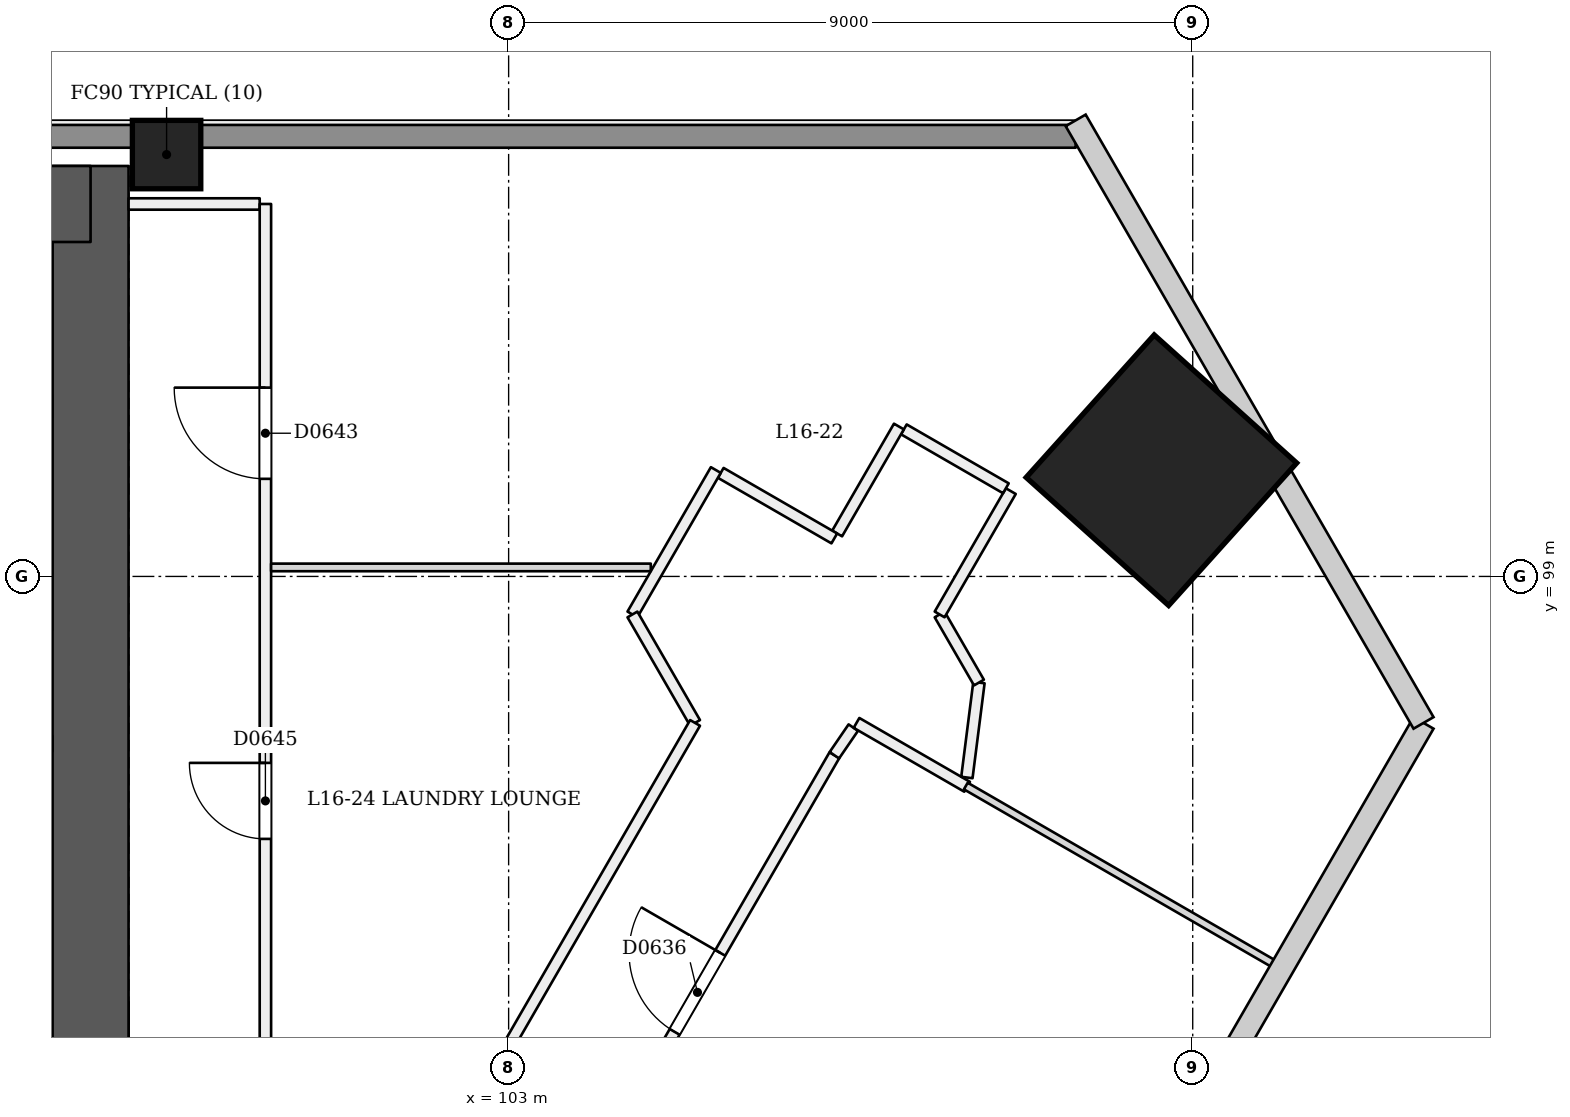
"""IFC4 building model, lengths in metres.
Left out: names, types, materials, properties, quantities, classifications, styles, units other than length and angle.
Written with IfcOpenShell. Run it as: python <this file> out.ifc"""

import sys

from ifc_helpers import new_model, si_unit, direction, frame, frame_2d, origin, origin_2d, place, context, subcontext, project, spatial, rectangle, extrude, element, fill, save


model = new_model("IFC4")
c1 = context("Model", 3, precision=1e-05, world=origin(), true_north=direction((0.0, 1.0)))
c2 = subcontext(c1, "Body", "Model", "MODEL_VIEW")
j1 = project(units=[si_unit("LENGTHUNIT", "METRE"), si_unit("PLANEANGLEUNIT", "RADIAN")], contexts=[c1])
p1 = place(None, origin())
s1 = spatial("IfcSite", under=j1, at=p1, CompositionType="ELEMENT")
p2 = place(p1, origin())
s2 = spatial("IfcBuilding", under=s1, at=p2, CompositionType="ELEMENT")
p3 = place(p2, frame((0.0, 0.0, 66.6)))
s3 = spatial("IfcBuildingStorey", under=s2, at=p3, CompositionType="ELEMENT", Elevation=66.6)
p4 = place(p3, frame((72.5, 92.9, 0.0), z_axis=(0.0, 0.0, 1.0), x_axis=(1.0, 0.0, 0.0)))
e1 = element("IfcWall", 1, at=p4, inside=s3, PredefinedType="SHEAR", context=c2, shape_type="SweptSolid", body=[
    extrude(rectangle(XDim=25.5, YDim=1.0, at=frame_2d((12.75, 0.0))), origin(), (0.0, 0.0, 1.0), 3.6),
])
p5 = place(p4, frame((1.3, 0.0, 0.0)))
e2 = element("IfcOpeningElement", 2, at=p5, cuts=e1, PredefinedType="OPENING", context=c2, shape_type="SweptSolid", body=[
    extrude(rectangle(XDim=1.2, YDim=2.1, at=frame_2d((0.6, 1.05))), frame((0.0, 0.51, 0.0), z_axis=(0.0, -1.0, 0.0), x_axis=(1.0, 0.0, 0.0)), (0.0, 0.0, 1.0), 1.021),
])
p6 = place(p4, frame((3.5, 0.0, 0.0)))
e3 = element("IfcOpeningElement", 3, at=p6, cuts=e1, PredefinedType="OPENING", context=c2, shape_type="SweptSolid", body=[
    extrude(rectangle(XDim=1.2, YDim=2.1, at=frame_2d((0.6, 1.05))), frame((0.0, 0.51, 0.0), z_axis=(0.0, -1.0, 0.0), x_axis=(1.0, 0.0, 0.0)), (0.0, 0.0, 1.0), 1.021),
])
p7 = place(p4, frame((13.5, 0.0, 0.0)))
e4 = element("IfcOpeningElement", 4, at=p7, cuts=e1, PredefinedType="OPENING", context=c2, shape_type="SweptSolid", body=[
    extrude(rectangle(XDim=1.2, YDim=2.1, at=frame_2d((0.6, 1.05))), frame((0.0, 0.51, 0.0), z_axis=(0.0, -1.0, 0.0), x_axis=(1.0, 0.0, 0.0)), (0.0, 0.0, 1.0), 1.021),
])
p8 = place(p4, frame((16.363, 0.0, 0.0)))
e5 = element("IfcOpeningElement", 5, at=p8, cuts=e1, PredefinedType="OPENING", context=c2, shape_type="SweptSolid", body=[
    extrude(rectangle(XDim=1.0, YDim=2.1, at=frame_2d((0.5, 1.05))), frame((0.0, 0.51, 0.0), z_axis=(0.0, -1.0, 0.0), x_axis=(1.0, 0.0, 0.0)), (0.0, 0.0, 1.0), 1.021),
])
p9 = place(p4, frame((19.8, 0.0, 0.0)))
e6 = element("IfcOpeningElement", 6, at=p9, cuts=e1, PredefinedType="OPENING", context=c2, shape_type="SweptSolid", body=[
    extrude(rectangle(XDim=1.0, YDim=2.1, at=frame_2d((0.5, 1.05))), frame((0.0, 0.51, 0.0), z_axis=(0.0, -1.0, 0.0), x_axis=(1.0, 0.0, 0.0)), (0.0, 0.0, 1.0), 1.021),
])
p10 = place(p4, frame((22.788, 0.0, 0.0)))
e7 = element("IfcOpeningElement", 7, at=p10, cuts=e1, PredefinedType="OPENING", context=c2, shape_type="SweptSolid", body=[
    extrude(rectangle(XDim=1.0, YDim=2.1, at=frame_2d((0.5, 1.05))), frame((0.0, 0.51, 0.0), z_axis=(0.0, -1.0, 0.0), x_axis=(1.0, 0.0, 0.0)), (0.0, 0.0, 1.0), 1.021),
])
p11 = place(p3, frame((97.5, 92.9, 0.0), z_axis=(0.0, 0.0, 1.0), x_axis=(0.0, 1.0, 0.0)))
e8 = element("IfcWall", 8, at=p11, inside=s3, PredefinedType="SHEAR", context=c2, shape_type="SweptSolid", body=[
    extrude(rectangle(XDim=11.5, YDim=1.0, at=frame_2d((5.75, 0.0))), origin(), (0.0, 0.0, 1.0), 3.6),
])
p12 = place(p3, frame((97.5, 103.9, 0.0), z_axis=(0.0, 0.0, 1.0), x_axis=(-1.0, 0.0, 0.0)))
e9 = element("IfcWall", 9, at=p12, inside=s3, PredefinedType="SHEAR", context=c2, shape_type="SweptSolid", body=[
    extrude(rectangle(XDim=25.5, YDim=1.0, at=frame_2d((12.75, 0.0))), origin(), (0.0, 0.0, 1.0), 3.6),
])
p13 = place(p3, frame((111.623, 100.386, 0.0), z_axis=(-0.028403721265, 0.009287135593, 0.999553389135), x_axis=(0.498883740729, -0.866383866755, 0.02222630567)))
e10 = element("IfcColumn", 10, at=p13, inside=s3, PredefinedType="COLUMN", context=c2, shape_type="SweptSolid", body=[
    extrude(rectangle(XDim=2.52, YDim=2.52, at=origin_2d()), origin(), (0.0, 0.0, 1.0), 3.602),
])
p14 = place(p3, frame((98.5, 104.55, 0.0), z_axis=(0.0, 0.0, 1.0), x_axis=(1.0, 0.0, 0.0)))
e11 = element("IfcColumn", 11, at=p14, inside=s3, PredefinedType="COLUMN", context=c2, shape_type="SweptSolid", body=[
    extrude(rectangle(XDim=0.9, YDim=0.9, at=origin_2d()), origin(), (0.0, 0.0, 1.0), 3.6),
])
p15 = place(p3, frame((85.824, 59.475, 0.0), z_axis=(0.0, 0.0, 1.0), x_axis=(0.499998498473, 0.86602627069, 0.0)))
e12 = element("IfcWall", 12, at=p15, inside=s3, PredefinedType="PARTITIONING", context=c2, shape_type="SweptSolid", body=[
    extrude(rectangle(XDim=42.924, YDim=0.15, at=frame_2d((21.462, 0.0))), origin(), (0.0, 0.0, 1.0), 2.7),
])
p16 = place(p15, frame((3.492, 0.0, 0.0)))
e13 = element("IfcOpeningElement", 13, at=p16, cuts=e12, PredefinedType="OPENING", context=c2, shape_type="SweptSolid", body=[
    extrude(rectangle(XDim=1.2, YDim=2.1, at=frame_2d((0.6, 1.05))), frame((0.0, 0.085, 0.0), z_axis=(0.0, -1.0, 0.0), x_axis=(1.0, 0.0, 0.0)), (0.0, 0.0, 1.0), 0.171),
])
p17 = place(p15, frame((14.357, 0.0, 0.0)))
e14 = element("IfcOpeningElement", 14, at=p17, cuts=e12, PredefinedType="OPENING", context=c2, shape_type="SweptSolid", body=[
    extrude(rectangle(XDim=1.2, YDim=2.1, at=frame_2d((0.6, 1.05))), frame((0.0, 0.085, 0.0), z_axis=(0.0, -1.0, 0.0), x_axis=(1.0, 0.0, 0.0)), (0.0, 0.0, 1.0), 0.171),
])
p18 = place(p15, frame((27.857, 0.0, 0.0)))
e15 = element("IfcOpeningElement", 15, at=p18, cuts=e12, PredefinedType="OPENING", context=c2, shape_type="SweptSolid", body=[
    extrude(rectangle(XDim=1.2, YDim=2.1, at=frame_2d((0.6, 1.05))), frame((0.0, 0.085, 0.0), z_axis=(0.0, -1.0, 0.0), x_axis=(1.0, 0.0, 0.0)), (0.0, 0.0, 1.0), 0.171),
])
p19 = place(p15, frame((38.721, 0.0, 0.0)))
e16 = element("IfcOpeningElement", 16, at=p19, cuts=e12, PredefinedType="OPENING", context=c2, shape_type="SweptSolid", body=[
    extrude(rectangle(XDim=1.2, YDim=2.1, at=frame_2d((0.6, 1.05))), frame((0.0, 0.085, 0.0), z_axis=(0.0, -1.0, 0.0), x_axis=(1.0, 0.0, 0.0)), (0.0, 0.0, 1.0), 0.171),
])
p20 = place(p3, frame((107.286, 96.648, 0.0), z_axis=(0.0, 0.0, 1.0), x_axis=(0.565021791191, 0.82507598164, 0.0)))
e17 = element("IfcWall", 17, at=p20, inside=s3, PredefinedType="PARTITIONING", context=c2, shape_type="SweptSolid", body=[
    extrude(rectangle(XDim=0.44, YDim=0.15, at=frame_2d((0.22, 0.0))), origin(), (0.0, 0.0, 1.0), 3.1),
])
p21 = place(p3, frame((107.577, 97.073, 0.0), z_axis=(0.0, 0.0, 1.0), x_axis=(0.865999293341, -0.500045221889, 0.0)))
e18 = element("IfcWall", 18, at=p21, inside=s3, PredefinedType="PARTITIONING", context=c2, shape_type="SweptSolid", body=[
    extrude(rectangle(XDim=1.68, YDim=0.15, at=frame_2d((0.84, 0.0))), origin(), (0.0, 0.0, 1.0), 3.1),
])
p22 = place(p3, frame((99.725, 103.9, 0.0), z_axis=(0.0, 0.0, 1.0), x_axis=(-1.0, 0.0, 0.0)))
e19 = element("IfcWall", 19, at=p22, inside=s3, PredefinedType="PARTITIONING", context=c2, shape_type="SweptSolid", body=[
    extrude(rectangle(XDim=1.725, YDim=0.15, at=frame_2d((0.863, 0.0))), origin(), (0.0, 0.0, 1.0), 2.6),
])
p23 = place(p3, frame((109.029, 96.355, 0.0), z_axis=(0.0, 0.0, 1.0), x_axis=(0.126039175565, 0.992025264912, 0.0)))
e20 = element("IfcWall", 20, at=p23, inside=s3, PredefinedType="PARTITIONING", context=c2, shape_type="SweptSolid", body=[
    extrude(rectangle(XDim=1.259, YDim=0.15, at=frame_2d((0.629, 0.0))), origin(), (0.0, 0.0, 1.0), 3.1),
])
p24 = place(p3, frame((109.188, 97.604, 0.0), z_axis=(0.0, 0.0, 1.0), x_axis=(-0.500096801311, 0.865969508308, 0.0)))
e21 = element("IfcWall", 21, at=p24, inside=s3, PredefinedType="PARTITIONING", context=c2, shape_type="SweptSolid", body=[
    extrude(rectangle(XDim=1.035, YDim=0.15, at=frame_2d((0.518, 0.0))), origin(), (0.0, 0.0, 1.0), 3.1),
])
p25 = place(p3, frame((108.67, 98.5, 0.0), z_axis=(0.0, 0.0, 1.0), x_axis=(0.499951854219, 0.86605319898, 0.0)))
e22 = element("IfcWall", 22, at=p25, inside=s3, PredefinedType="PARTITIONING", context=c2, shape_type="SweptSolid", body=[
    extrude(rectangle(XDim=1.873, YDim=0.15, at=frame_2d((0.937, 0.0))), origin(), (0.0, 0.0, 1.0), 3.1),
])
p26 = place(p3, frame((109.542, 100.16, 0.0), z_axis=(0.0, 0.0, 1.0), x_axis=(-0.865975732936, 0.500086022567, 0.0)))
e23 = element("IfcWall", 23, at=p26, inside=s3, PredefinedType="PARTITIONING", context=c2, shape_type="SweptSolid", body=[
    extrude(rectangle(XDim=1.55, YDim=0.15, at=frame_2d((0.775, 0.0))), origin(), (0.0, 0.0, 1.0), 3.1),
])
p27 = place(p3, frame((108.135, 100.972, 0.0), z_axis=(0.0, 0.0, 1.0), x_axis=(-0.500017246033, -0.866015446554, 0.0)))
e24 = element("IfcWall", 24, at=p27, inside=s3, PredefinedType="PARTITIONING", context=c2, shape_type="SweptSolid", body=[
    extrude(rectangle(XDim=1.625, YDim=0.15, at=frame_2d((0.812, 0.0))), origin(), (0.0, 0.0, 1.0), 3.1),
])
p28 = place(p3, frame((107.284, 99.5, 0.0), z_axis=(0.0, 0.0, 1.0), x_axis=(-0.866013532718, 0.500020560727, 0.0)))
e25 = element("IfcWall", 25, at=p28, inside=s3, PredefinedType="PARTITIONING", context=c2, shape_type="SweptSolid", body=[
    extrude(rectangle(XDim=1.725, YDim=0.15, at=frame_2d((0.863, 0.0))), origin(), (0.0, 0.0, 1.0), 3.1),
])
p29 = place(p3, frame((105.726, 100.4, 0.0), z_axis=(0.0, 0.0, 1.0), x_axis=(-0.500005024956, -0.866022502605, 0.0)))
e26 = element("IfcWall", 26, at=p29, inside=s3, PredefinedType="PARTITIONING", context=c2, shape_type="SweptSolid", body=[
    extrude(rectangle(XDim=2.194, YDim=0.15, at=frame_2d((1.097, 0.0))), origin(), (0.0, 0.0, 1.0), 3.1),
])
p30 = place(p3, frame((104.629, 98.5, 0.0), z_axis=(0.0, 0.0, 1.0), x_axis=(0.500043078269, -0.866000531106, 0.0)))
e27 = element("IfcWall", 27, at=p30, inside=s3, PredefinedType="PARTITIONING", context=c2, shape_type="SweptSolid", body=[
    extrude(rectangle(XDim=1.648, YDim=0.15, at=frame_2d((0.824, 0.0))), origin(), (0.0, 0.0, 1.0), 3.1),
])
p31 = place(p3, frame((105.453, 97.073, 0.0), z_axis=(0.0, 0.0, 1.0), x_axis=(-0.499997913005, -0.866026608708, 0.0)))
e28 = element("IfcWall", 28, at=p31, inside=s3, PredefinedType="PARTITIONING", context=c2, shape_type="SweptSolid", body=[
    extrude(rectangle(XDim=5.396, YDim=0.15, at=frame_2d((2.698, 0.0))), origin(), (0.0, 0.0, 1.0), 3.1),
])
p32 = place(p3, frame((99.8, 92.4, 0.0), z_axis=(0.0, 0.0, 1.0), x_axis=(0.0, 1.0, 0.0)))
e29 = element("IfcWall", 29, at=p32, inside=s3, PredefinedType="PARTITIONING", context=c2, shape_type="SweptSolid", body=[
    extrude(rectangle(XDim=11.5, YDim=0.15, at=frame_2d((5.75, 0.0))), origin(), (0.0, 0.0, 1.0), 2.6),
])
p33 = place(p32, frame((7.884, 0.0, 0.0)))
e30 = element("IfcOpeningElement", 30, at=p33, cuts=e29, PredefinedType="OPENING", context=c2, shape_type="SweptSolid", body=[
    extrude(rectangle(XDim=1.2, YDim=2.1, at=frame_2d((0.6, 1.05))), frame((0.0, 0.085, 0.0), z_axis=(0.0, -1.0, 0.0), x_axis=(1.0, 0.0, 0.0)), (0.0, 0.0, 1.0), 0.171),
])
p34 = place(p32, frame((3.147, 0.0, 0.0)))
e31 = element("IfcOpeningElement", 31, at=p34, cuts=e29, PredefinedType="OPENING", context=c2, shape_type="SweptSolid", body=[
    extrude(rectangle(XDim=1.0, YDim=2.1, at=frame_2d((0.5, 1.05))), frame((0.0, 0.085, 0.0), z_axis=(0.0, -1.0, 0.0), x_axis=(1.0, 0.0, 0.0)), (0.0, 0.0, 1.0), 0.171),
])
p35 = place(p3, frame((113.085, 93.893, 0.0), z_axis=(0.0, 0.0, 1.0), x_axis=(-0.866038532462, 0.499977259774, 0.0)))
e32 = element("IfcWall", 32, at=p35, inside=s3, PredefinedType="PARTITIONING", context=c2, shape_type="SweptSolid", body=[
    extrude(rectangle(XDim=4.7, YDim=0.1, at=frame_2d((2.35, 0.0))), origin(), (0.0, 0.0, 1.0), 2.6),
])
p36 = place(p3, frame((99.875, 99.119, 0.0), z_axis=(0.0, 0.0, 1.0), x_axis=(1.0, 0.0, 0.0)))
e33 = element("IfcWall", 33, at=p36, inside=s3, PredefinedType="PARTITIONING", context=c2, shape_type="SweptSolid", body=[
    extrude(rectangle(XDim=4.995, YDim=0.1, at=frame_2d((2.498, 0.0))), origin(), (0.0, 0.0, 1.0), 3.1),
])
p37 = place(p3, frame((59.54, 104.79, 0.0), z_axis=(0.0, 0.0, 1.0), x_axis=(1.0, 0.0, 0.0)))
e34 = element("IfcWall", 34, at=p37, inside=s3, PredefinedType="SOLIDWALL", context=c2, shape_type="SweptSolid", body=[
    extrude(rectangle(XDim=50.92, YDim=0.3, at=frame_2d((25.46, 0.0))), origin(), (0.0, 0.0, 1.0), 2.6),
])
p38 = place(p19, origin())
e35 = element("IfcDoor", 35, at=p38, inside=s3, OperationType="SINGLE_SWING_RIGHT", PredefinedType="NOTDEFINED", context=c2, shape_type="SweptSolid", body=[
    extrude(rectangle(XDim=1.2, YDim=2.1, at=frame_2d((0.6, 1.05))), frame((0.0, 0.025, 0.0), z_axis=(0.0, -1.0, 0.0), x_axis=(1.0, 0.0, 0.0)), (0.0, 0.0, 1.0), 0.05),
])
fill(e16, e35)
p39 = place(p33, origin())
e36 = element("IfcDoor", 36, at=p39, inside=s3, OperationType="SINGLE_SWING_RIGHT", PredefinedType="NOTDEFINED", context=c2, shape_type="SweptSolid", body=[
    extrude(rectangle(XDim=1.2, YDim=2.1, at=frame_2d((0.6, 1.05))), frame((0.0, 0.025, 0.0), z_axis=(0.0, -1.0, 0.0), x_axis=(1.0, 0.0, 0.0)), (0.0, 0.0, 1.0), 0.05),
])
fill(e30, e36)
p40 = place(p34, origin())
e37 = element("IfcDoor", 37, at=p40, inside=s3, OperationType="SINGLE_SWING_RIGHT", PredefinedType="NOTDEFINED", context=c2, shape_type="SweptSolid", body=[
    extrude(rectangle(XDim=1.0, YDim=2.1, at=frame_2d((0.5, 1.05))), frame((0.0, 0.025, 0.0), z_axis=(0.0, -1.0, 0.0), x_axis=(1.0, 0.0, 0.0)), (0.0, 0.0, 1.0), 0.05),
])
fill(e31, e37)
save(model, sys.argv[1])
